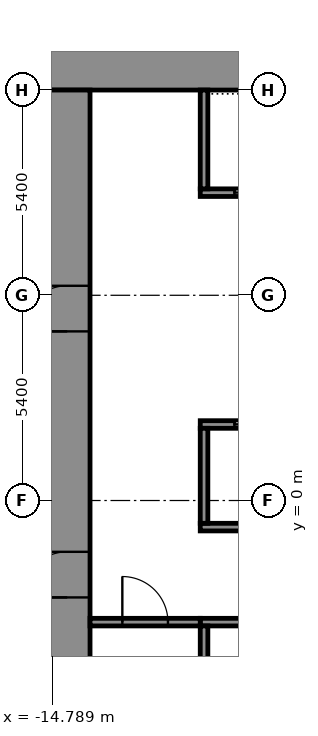
"""IFC4 building model, lengths in metres.
Left out: names, types, materials, properties, quantities, classifications, styles, units other than length and angle.
Written with IfcOpenShell. Run it as: python <this file> out.ifc"""

import sys

from ifc_helpers import new_model, si_unit, direction, frame, frame_2d, origin, place, context, subcontext, project, spatial, rectangle, extrude, element, fill, save


model = new_model("IFC4")
c1 = context("Model", 3, precision=1e-05, world=origin(), true_north=direction((0.0, 1.0)))
c2 = subcontext(c1, "Body", "Model", "MODEL_VIEW")
j1 = project(units=[si_unit("LENGTHUNIT", "METRE"), si_unit("PLANEANGLEUNIT", "RADIAN")], contexts=[c1])
p1 = place(None, origin())
s1 = spatial("IfcSite", under=j1, at=p1, CompositionType="ELEMENT")
p2 = place(p1, origin())
s2 = spatial("IfcBuilding", under=s1, at=p2, CompositionType="ELEMENT")
p3 = place(p2, frame((0.0, 0.0, 16.0)))
s3 = spatial("IfcBuildingStorey", under=s2, at=p3, CompositionType="ELEMENT", Elevation=16.0)
p4 = place(p3, frame((-15.0, 11.4, 0.0), z_axis=(0.0, 0.0, 1.0), x_axis=(1.0, 0.0, 0.0)))
e1 = element("IfcWall", 1, at=p4, inside=s3, PredefinedType="SHEAR", context=c2, shape_type="SweptSolid", body=[
    extrude(rectangle(XDim=30.0, YDim=1.2, at=frame_2d((15.0, 0.0))), origin(), (0.0, 0.0, 1.0), 4.5),
])
p5 = place(p3, frame((-14.4, -10.8, 0.0), z_axis=(0.0, 0.0, 1.0), x_axis=(0.0, 1.0, 0.0)))
e2 = element("IfcWall", 2, at=p5, inside=s3, PredefinedType="SHEAR", context=c2, shape_type="SweptSolid", body=[
    extrude(rectangle(XDim=21.6, YDim=1.2, at=frame_2d((10.8, 0.0))), origin(), (0.0, 0.0, 1.0), 4.5),
])
p6 = place(p5, frame((8.25, 0.0, 0.0)))
e3 = element("IfcOpeningElement", 3, at=p6, cuts=e2, PredefinedType="OPENING", context=c2, shape_type="SweptSolid", body=[
    extrude(rectangle(XDim=1.2, YDim=2.1, at=frame_2d((0.6, 1.05))), frame((0.0, 0.61, 0.0), z_axis=(0.0, -1.0, 0.0), x_axis=(1.0, 0.0, 0.0)), (0.0, 0.0, 1.0), 1.22),
])
p7 = place(p5, frame((15.25, 0.0, 0.0)))
e4 = element("IfcOpeningElement", 4, at=p7, cuts=e2, PredefinedType="OPENING", context=c2, shape_type="SweptSolid", body=[
    extrude(rectangle(XDim=1.2, YDim=2.1, at=frame_2d((0.6, 1.05))), frame((0.0, 0.61, 0.0), z_axis=(0.0, -1.0, 0.0), x_axis=(1.0, 0.0, 0.0)), (0.0, 0.0, 1.0), 1.22),
])
p8 = place(p3, frame((-10.9, -3.2, 0.0), z_axis=(0.0, 0.0, 1.0), x_axis=(1.0, 0.0, 0.0)))
e5 = element("IfcWall", 5, at=p8, inside=s3, PredefinedType="SHEAR", context=c2, shape_type="SweptSolid", body=[
    extrude(rectangle(XDim=21.8, YDim=0.2, at=frame_2d((10.9, 0.0))), origin(), (0.0, 0.0, 1.0), 3.95),
])
p9 = place(p8, frame((1.075, 0.0, 0.0)))
e6 = element("IfcOpeningElement", 6, at=p9, cuts=e5, PredefinedType="OPENING", context=c2, shape_type="SweptSolid", body=[
    extrude(rectangle(XDim=1.1, YDim=2.1, at=frame_2d((0.55, 1.05))), frame((0.0, 0.11, 0.0), z_axis=(0.0, -1.0, 0.0), x_axis=(1.0, 0.0, 0.0)), (0.0, 0.0, 1.0), 0.22),
])
p10 = place(p8, frame((10.325, 0.0, 0.0)))
e7 = element("IfcOpeningElement", 7, at=p10, cuts=e5, PredefinedType="OPENING", context=c2, shape_type="SweptSolid", body=[
    extrude(rectangle(XDim=1.1, YDim=2.1, at=frame_2d((0.55, 1.05))), frame((0.0, 0.11, 0.0), z_axis=(0.0, -1.0, 0.0), x_axis=(1.0, 0.0, 0.0)), (0.0, 0.0, 1.0), 0.22),
])
p11 = place(p8, frame((19.625, 0.0, 0.0)))
e8 = element("IfcOpeningElement", 8, at=p11, cuts=e5, PredefinedType="OPENING", context=c2, shape_type="SweptSolid", body=[
    extrude(rectangle(XDim=1.1, YDim=2.1, at=frame_2d((0.55, 1.05))), frame((0.0, 0.11, 0.0), z_axis=(0.0, -1.0, 0.0), x_axis=(1.0, 0.0, 0.0)), (0.0, 0.0, 1.0), 0.22),
])
p12 = place(p8, frame((5.7, 0.0, 0.0)))
e9 = element("IfcOpeningElement", 9, at=p12, cuts=e5, PredefinedType="OPENING", context=c2, shape_type="SweptSolid", body=[
    extrude(rectangle(XDim=1.1, YDim=2.1, at=frame_2d((0.55, 1.05))), frame((0.0, 0.11, 0.0), z_axis=(0.0, -1.0, 0.0), x_axis=(1.0, 0.0, 0.0)), (0.0, 0.0, 1.0), 0.22),
])
p13 = place(p8, frame((14.975, 0.0, 0.0)))
e10 = element("IfcOpeningElement", 10, at=p13, cuts=e5, PredefinedType="OPENING", context=c2, shape_type="SweptSolid", body=[
    extrude(rectangle(XDim=1.1, YDim=2.1, at=frame_2d((0.55, 1.05))), frame((0.0, 0.11, 0.0), z_axis=(0.0, -1.0, 0.0), x_axis=(1.0, 0.0, 0.0)), (0.0, 0.0, 1.0), 0.22),
])
p14 = place(p3, frame((-10.9, -0.7, 0.0), z_axis=(0.0, 0.0, 1.0), x_axis=(1.0, 0.0, 0.0)))
e11 = element("IfcWall", 11, at=p14, inside=s3, PredefinedType="SHEAR", context=c2, shape_type="SweptSolid", body=[
    extrude(rectangle(XDim=21.8, YDim=0.2, at=frame_2d((10.9, 0.0))), origin(), (0.0, 0.0, 1.0), 3.95),
])
p15 = place(p3, frame((-10.9, 2.0, 0.0), z_axis=(0.0, 0.0, 1.0), x_axis=(1.0, 0.0, 0.0)))
e12 = element("IfcWall", 12, at=p15, inside=s3, PredefinedType="SHEAR", context=c2, shape_type="SweptSolid", body=[
    extrude(rectangle(XDim=21.8, YDim=0.2, at=frame_2d((10.9, 0.0))), origin(), (0.0, 0.0, 1.0), 3.95),
])
p16 = place(p15, frame((0.9, 0.0, 0.0)))
e13 = element("IfcOpeningElement", 13, at=p16, cuts=e12, PredefinedType="OPENING", context=c2, shape_type="SweptSolid", body=[
    extrude(rectangle(XDim=1.1, YDim=2.1, at=frame_2d((0.55, 1.05))), frame((0.0, 0.11, 0.0), z_axis=(0.0, -1.0, 0.0), x_axis=(1.0, 0.0, 0.0)), (0.0, 0.0, 1.0), 0.22),
])
p17 = place(p15, frame((3.6, 0.0, 0.0)))
e14 = element("IfcOpeningElement", 14, at=p17, cuts=e12, PredefinedType="OPENING", context=c2, shape_type="SweptSolid", body=[
    extrude(rectangle(XDim=1.1, YDim=2.1, at=frame_2d((0.55, 1.05))), frame((0.0, 0.11, 0.0), z_axis=(0.0, -1.0, 0.0), x_axis=(1.0, 0.0, 0.0)), (0.0, 0.0, 1.0), 0.22),
])
p18 = place(p15, frame((6.3, 0.0, 0.0)))
e15 = element("IfcOpeningElement", 15, at=p18, cuts=e12, PredefinedType="OPENING", context=c2, shape_type="SweptSolid", body=[
    extrude(rectangle(XDim=1.1, YDim=2.1, at=frame_2d((0.55, 1.05))), frame((0.0, 0.11, 0.0), z_axis=(0.0, -1.0, 0.0), x_axis=(1.0, 0.0, 0.0)), (0.0, 0.0, 1.0), 0.22),
])
p19 = place(p15, frame((9.0, 0.0, 0.0)))
e16 = element("IfcOpeningElement", 16, at=p19, cuts=e12, PredefinedType="OPENING", context=c2, shape_type="SweptSolid", body=[
    extrude(rectangle(XDim=1.1, YDim=2.1, at=frame_2d((0.55, 1.05))), frame((0.0, 0.11, 0.0), z_axis=(0.0, -1.0, 0.0), x_axis=(1.0, 0.0, 0.0)), (0.0, 0.0, 1.0), 0.22),
])
p20 = place(p15, frame((11.7, 0.0, 0.0)))
e17 = element("IfcOpeningElement", 17, at=p20, cuts=e12, PredefinedType="OPENING", context=c2, shape_type="SweptSolid", body=[
    extrude(rectangle(XDim=1.1, YDim=2.1, at=frame_2d((0.55, 1.05))), frame((0.0, 0.11, 0.0), z_axis=(0.0, -1.0, 0.0), x_axis=(1.0, 0.0, 0.0)), (0.0, 0.0, 1.0), 0.22),
])
p21 = place(p15, frame((15.85, 0.0, 0.0)))
e18 = element("IfcOpeningElement", 18, at=p21, cuts=e12, PredefinedType="OPENING", context=c2, shape_type="SweptSolid", body=[
    extrude(rectangle(XDim=0.9, YDim=2.1, at=frame_2d((0.45, 1.05))), frame((0.0, 0.11, 0.0), z_axis=(0.0, -1.0, 0.0), x_axis=(1.0, 0.0, 0.0)), (0.0, 0.0, 1.0), 0.22),
])
p22 = place(p15, frame((19.9, 0.0, 0.0)))
e19 = element("IfcOpeningElement", 19, at=p22, cuts=e12, PredefinedType="OPENING", context=c2, shape_type="SweptSolid", body=[
    extrude(rectangle(XDim=0.9, YDim=2.1, at=frame_2d((0.45, 1.05))), frame((0.0, 0.11, 0.0), z_axis=(0.0, -1.0, 0.0), x_axis=(1.0, 0.0, 0.0)), (0.0, 0.0, 1.0), 0.22),
])
p23 = place(p3, frame((-10.9, 8.1, 0.0), z_axis=(0.0, 0.0, 1.0), x_axis=(1.0, 0.0, 0.0)))
e20 = element("IfcWall", 20, at=p23, inside=s3, PredefinedType="SHEAR", context=c2, shape_type="SweptSolid", body=[
    extrude(rectangle(XDim=21.8, YDim=0.2, at=frame_2d((10.9, 0.0))), origin(), (0.0, 0.0, 1.0), 3.95),
])
p24 = place(p23, frame((0.9, 0.0, 0.0)))
e21 = element("IfcOpeningElement", 21, at=p24, cuts=e20, PredefinedType="OPENING", context=c2, shape_type="SweptSolid", body=[
    extrude(rectangle(XDim=1.1, YDim=2.1, at=frame_2d((0.55, 1.05))), frame((0.0, 0.11, 0.0), z_axis=(0.0, -1.0, 0.0), x_axis=(1.0, 0.0, 0.0)), (0.0, 0.0, 1.0), 0.22),
])
p25 = place(p23, frame((3.6, 0.0, 0.0)))
e22 = element("IfcOpeningElement", 22, at=p25, cuts=e20, PredefinedType="OPENING", context=c2, shape_type="SweptSolid", body=[
    extrude(rectangle(XDim=1.1, YDim=2.1, at=frame_2d((0.55, 1.05))), frame((0.0, 0.11, 0.0), z_axis=(0.0, -1.0, 0.0), x_axis=(1.0, 0.0, 0.0)), (0.0, 0.0, 1.0), 0.22),
])
p26 = place(p23, frame((6.3, 0.0, 0.0)))
e23 = element("IfcOpeningElement", 23, at=p26, cuts=e20, PredefinedType="OPENING", context=c2, shape_type="SweptSolid", body=[
    extrude(rectangle(XDim=1.1, YDim=2.1, at=frame_2d((0.55, 1.05))), frame((0.0, 0.11, 0.0), z_axis=(0.0, -1.0, 0.0), x_axis=(1.0, 0.0, 0.0)), (0.0, 0.0, 1.0), 0.22),
])
p27 = place(p23, frame((9.0, 0.0, 0.0)))
e24 = element("IfcOpeningElement", 24, at=p27, cuts=e20, PredefinedType="OPENING", context=c2, shape_type="SweptSolid", body=[
    extrude(rectangle(XDim=1.1, YDim=2.1, at=frame_2d((0.55, 1.05))), frame((0.0, 0.11, 0.0), z_axis=(0.0, -1.0, 0.0), x_axis=(1.0, 0.0, 0.0)), (0.0, 0.0, 1.0), 0.22),
])
p28 = place(p23, frame((11.7, 0.0, 0.0)))
e25 = element("IfcOpeningElement", 25, at=p28, cuts=e20, PredefinedType="OPENING", context=c2, shape_type="SweptSolid", body=[
    extrude(rectangle(XDim=1.1, YDim=2.1, at=frame_2d((0.55, 1.05))), frame((0.0, 0.11, 0.0), z_axis=(0.0, -1.0, 0.0), x_axis=(1.0, 0.0, 0.0)), (0.0, 0.0, 1.0), 0.22),
])
p29 = place(p23, frame((17.2, 0.0, 0.0)))
e26 = element("IfcOpeningElement", 26, at=p29, cuts=e20, PredefinedType="OPENING", context=c2, shape_type="SweptSolid", body=[
    extrude(rectangle(XDim=0.9, YDim=2.1, at=frame_2d((0.45, 1.05))), frame((0.0, 0.11, 0.0), z_axis=(0.0, -1.0, 0.0), x_axis=(1.0, 0.0, 0.0)), (0.0, 0.0, 1.0), 0.22),
])
p30 = place(p3, frame((-10.8, -10.8, 0.0), z_axis=(0.0, 0.0, 1.0), x_axis=(0.0, 1.0, 0.0)))
e27 = element("IfcWall", 27, at=p30, inside=s3, PredefinedType="SHEAR", context=c2, shape_type="SweptSolid", body=[
    extrude(rectangle(XDim=7.5, YDim=0.2, at=frame_2d((3.75, 0.0))), origin(), (0.0, 0.0, 1.0), 3.95),
])
p31 = place(p3, frame((-10.8, -0.6, 0.0), z_axis=(0.0, 0.0, 1.0), x_axis=(0.0, 1.0, 0.0)))
e28 = element("IfcWall", 28, at=p31, inside=s3, PredefinedType="SHEAR", context=c2, shape_type="SweptSolid", body=[
    extrude(rectangle(XDim=2.5, YDim=0.2, at=frame_2d((1.25, 0.0))), origin(), (0.0, 0.0, 1.0), 3.95),
])
p32 = place(p3, frame((-10.8, 8.2, 0.0), z_axis=(0.0, 0.0, 1.0), x_axis=(0.0, 1.0, 0.0)))
e29 = element("IfcWall", 29, at=p32, inside=s3, PredefinedType="SHEAR", context=c2, shape_type="SweptSolid", body=[
    extrude(rectangle(XDim=2.6, YDim=0.2, at=frame_2d((1.3, 0.0))), origin(), (0.0, 0.0, 1.0), 3.95),
])
p33 = place(p3, frame((-13.8, -3.2, 0.0), z_axis=(0.0, 0.0, 1.0), x_axis=(1.0, 0.0, 0.0)))
e30 = element("IfcWall", 30, at=p33, inside=s3, PredefinedType="STANDARD", context=c2, shape_type="SweptSolid", body=[
    extrude(rectangle(XDim=2.9, YDim=0.2, at=frame_2d((1.45, 0.0))), origin(), (0.0, 0.0, 1.0), 3.95),
])
p34 = place(p33, frame((0.85, 0.0, 0.0)))
e31 = element("IfcOpeningElement", 31, at=p34, cuts=e30, PredefinedType="OPENING", context=c2, shape_type="SweptSolid", body=[
    extrude(rectangle(XDim=1.2, YDim=2.1, at=frame_2d((0.6, 1.05))), frame((0.0, 0.11, 0.0), z_axis=(0.0, -1.0, 0.0), x_axis=(1.0, 0.0, 0.0)), (0.0, 0.0, 1.0), 0.22),
])
p35 = place(p6, origin())
e32 = element("IfcDoor", 32, at=p35, inside=s3, OperationType="DOUBLE_DOOR_SINGLE_SWING", PredefinedType="DOOR", context=c2, shape_type="SweptSolid", body=[
    extrude(rectangle(XDim=1.2, YDim=2.1, at=frame_2d((0.6, 1.05))), frame((0.0, 0.025, 0.0), z_axis=(0.0, -1.0, 0.0), x_axis=(1.0, 0.0, 0.0)), (0.0, 0.0, 1.0), 0.05),
])
fill(e3, e32)
p36 = place(p7, origin())
e33 = element("IfcDoor", 33, at=p36, inside=s3, OperationType="DOUBLE_DOOR_SINGLE_SWING", PredefinedType="DOOR", context=c2, shape_type="SweptSolid", body=[
    extrude(rectangle(XDim=1.2, YDim=2.1, at=frame_2d((0.6, 1.05))), frame((0.0, 0.025, 0.0), z_axis=(0.0, -1.0, 0.0), x_axis=(1.0, 0.0, 0.0)), (0.0, 0.0, 1.0), 0.05),
])
fill(e4, e33)
p37 = place(p16, origin())
e34 = element("IfcDoor", 34, at=p37, inside=s3, OperationType="SLIDING_TO_LEFT", PredefinedType="DOOR", context=c2, shape_type="SweptSolid", body=[
    extrude(rectangle(XDim=1.1, YDim=2.1, at=frame_2d((0.55, 1.05))), frame((0.0, 0.025, 0.0), z_axis=(0.0, -1.0, 0.0), x_axis=(1.0, 0.0, 0.0)), (0.0, 0.0, 1.0), 0.05),
])
fill(e13, e34)
p38 = place(p24, origin())
e35 = element("IfcDoor", 35, at=p38, inside=s3, OperationType="SLIDING_TO_LEFT", PredefinedType="DOOR", context=c2, shape_type="SweptSolid", body=[
    extrude(rectangle(XDim=1.1, YDim=2.1, at=frame_2d((0.55, 1.05))), frame((0.0, 0.025, 0.0), z_axis=(0.0, -1.0, 0.0), x_axis=(1.0, 0.0, 0.0)), (0.0, 0.0, 1.0), 0.05),
])
fill(e21, e35)
p39 = place(p34, origin())
e36 = element("IfcDoor", 36, at=p39, inside=s3, OperationType="SINGLE_SWING_LEFT", PredefinedType="DOOR", context=c2, shape_type="SweptSolid", body=[
    extrude(rectangle(XDim=1.2, YDim=2.1, at=frame_2d((0.6, 1.05))), frame((0.0, 0.025, 0.0), z_axis=(0.0, -1.0, 0.0), x_axis=(1.0, 0.0, 0.0)), (0.0, 0.0, 1.0), 0.05),
])
fill(e31, e36)
save(model, sys.argv[1])
